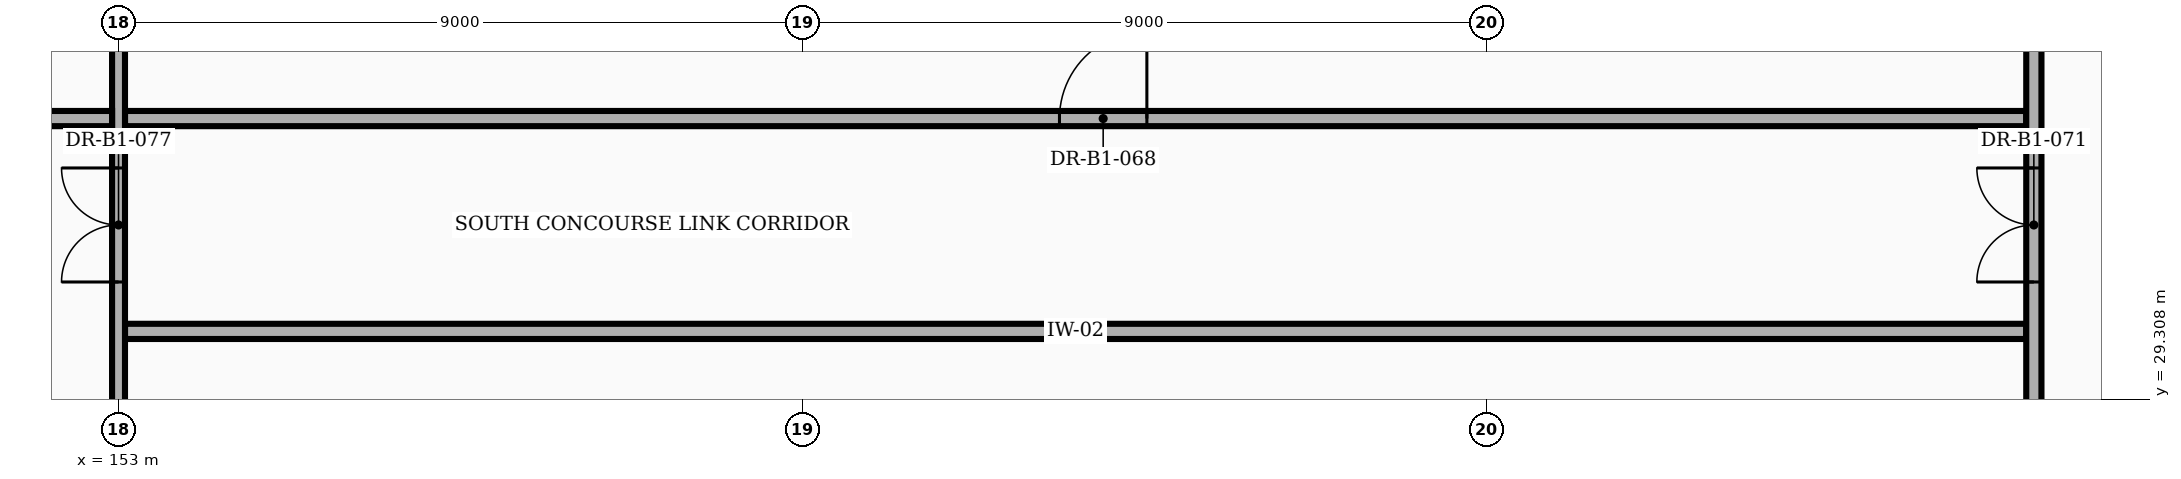
"""IFC4 building model, lengths in metres.
Left out: names, types, materials, properties, quantities, classifications, styles, units other than length and angle.
Written with IfcOpenShell. Run it as: python <this file> out.ifc"""

import sys

from ifc_helpers import new_model, si_unit, direction, frame, frame_2d, origin, place, context, subcontext, project, spatial, rectangle, extrude, element, fill, save


model = new_model("IFC4")
c1 = context("Model", 3, precision=1e-05, world=origin(), true_north=direction((0.0, 1.0)))
c2 = subcontext(c1, "Body", "Model", "MODEL_VIEW")
j1 = project(units=[si_unit("LENGTHUNIT", "METRE"), si_unit("PLANEANGLEUNIT", "RADIAN")], contexts=[c1])
p1 = place(None, origin())
s1 = spatial("IfcSite", under=j1, at=p1, CompositionType="ELEMENT")
p2 = place(p1, origin())
s2 = spatial("IfcBuilding", under=s1, at=p2, CompositionType="ELEMENT")
p3 = place(p2, frame((0.0, 0.0, -4.5)))
s3 = spatial("IfcBuildingStorey", under=s2, at=p3, CompositionType="ELEMENT", Elevation=-4.5)
p4 = place(p3, frame((153.085, 30.2, 0.0), z_axis=(0.0, 0.0, 1.0), x_axis=(1.0, 0.0, 0.0)))
e1 = element("IfcWall", 1, at=p4, inside=s3, PredefinedType="PARTITIONING", context=c2, shape_type="SweptSolid", body=[
    extrude(rectangle(XDim=25.015, YDim=0.2, at=frame_2d((12.508, 0.0))), origin(), (0.0, 0.0, 1.0), 4.24),
])
p5 = place(p3, frame((153.085, 33.0, 0.0), z_axis=(0.0, 0.0, 1.0), x_axis=(1.0, 0.0, 0.0)))
e2 = element("IfcWall", 2, at=p5, inside=s3, PredefinedType="PARTITIONING", context=c2, shape_type="SweptSolid", body=[
    extrude(rectangle(XDim=25.015, YDim=0.2, at=frame_2d((12.508, 0.0))), origin(), (0.0, 0.0, 1.0), 4.24),
])
p6 = place(p5, frame((12.295, 0.0, 0.0)))
e3 = element("IfcOpeningElement", 3, at=p6, cuts=e2, PredefinedType="OPENING", context=c2, shape_type="SweptSolid", body=[
    extrude(rectangle(XDim=1.15, YDim=2.15, at=frame_2d((0.575, 1.075))), frame((0.0, 0.112, 0.0), z_axis=(0.0, -1.0, 0.0), x_axis=(1.0, 0.0, 0.0)), (0.0, 0.0, 1.0), 0.224),
])
p7 = place(p3, frame((178.2, 0.21, 0.0), z_axis=(0.0, 0.0, 1.0), x_axis=(0.0, 1.0, 0.0)))
e4 = element("IfcWall", 4, at=p7, inside=s3, PredefinedType="PARTITIONING", context=c2, shape_type="SweptSolid", body=[
    extrude(rectangle(XDim=39.03, YDim=0.2, at=frame_2d((19.515, 0.0))), origin(), (0.0, 0.0, 1.0), 4.24),
])
p8 = place(p7, frame((10.64, 0.0, 0.0)))
e5 = element("IfcOpeningElement", 5, at=p8, cuts=e4, PredefinedType="OPENING", context=c2, shape_type="SweptSolid", body=[
    extrude(rectangle(XDim=1.7, YDim=2.3, at=frame_2d((0.85, 1.15))), frame((0.0, 0.112, 0.0), z_axis=(0.0, -1.0, 0.0), x_axis=(1.0, 0.0, 0.0)), (0.0, 0.0, 1.0), 0.224),
])
p9 = place(p7, frame((23.64, 0.0, 0.0)))
e6 = element("IfcOpeningElement", 6, at=p9, cuts=e4, PredefinedType="OPENING", context=c2, shape_type="SweptSolid", body=[
    extrude(rectangle(XDim=1.7, YDim=2.3, at=frame_2d((0.85, 1.15))), frame((0.0, 0.112, 0.0), z_axis=(0.0, -1.0, 0.0), x_axis=(1.0, 0.0, 0.0)), (0.0, 0.0, 1.0), 0.224),
])
p10 = place(p7, frame((30.64, 0.0, 0.0)))
e7 = element("IfcOpeningElement", 7, at=p10, cuts=e4, PredefinedType="OPENING", context=c2, shape_type="SweptSolid", body=[
    extrude(rectangle(XDim=1.5, YDim=2.2, at=frame_2d((0.75, 1.1))), frame((0.0, 0.112, 0.0), z_axis=(0.0, -1.0, 0.0), x_axis=(1.0, 0.0, 0.0)), (0.0, 0.0, 1.0), 0.224),
])
p11 = place(p3, frame((153.0, 27.22, 0.0), z_axis=(0.0, 0.0, 1.0), x_axis=(0.0, 1.0, 0.0)))
e8 = element("IfcWall", 8, at=p11, inside=s3, PredefinedType="PARTITIONING", context=c2, shape_type="SweptSolid", body=[
    extrude(rectangle(XDim=8.56, YDim=0.17, at=frame_2d((4.28, 0.0))), origin(), (0.0, 0.0, 1.0), 3.707),
])
p12 = place(p11, frame((3.63, 0.0, 0.0)))
e9 = element("IfcOpeningElement", 9, at=p12, cuts=e8, PredefinedType="OPENING", context=c2, shape_type="SweptSolid", body=[
    extrude(rectangle(XDim=1.5, YDim=2.2, at=frame_2d((0.75, 1.1))), frame((0.0, 0.097, 0.0), z_axis=(0.0, -1.0, 0.0), x_axis=(1.0, 0.0, 0.0)), (0.0, 0.0, 1.0), 0.194),
])
p13 = place(p3, frame((80.06, 33.0, 0.0), z_axis=(0.0, 0.0, 1.0), x_axis=(1.0, 0.0, 0.0)))
e10 = element("IfcWall", 10, at=p13, inside=s3, PredefinedType="PARTITIONING", context=c2, shape_type="SweptSolid", body=[
    extrude(rectangle(XDim=72.855, YDim=0.2, at=frame_2d((36.427, 0.0))), origin(), (0.0, 0.0, 1.0), 4.24),
])
p14 = place(p13, frame((14.0, 0.0, 0.0)))
e11 = element("IfcOpeningElement", 11, at=p14, cuts=e10, PredefinedType="OPENING", context=c2, shape_type="SweptSolid", body=[
    extrude(rectangle(XDim=1.6, YDim=2.3, at=frame_2d((0.8, 1.15))), frame((0.0, 0.112, 0.0), z_axis=(0.0, -1.0, 0.0), x_axis=(1.0, 0.0, 0.0)), (0.0, 0.0, 1.0), 0.224),
])
p15 = place(p13, frame((57.0, 0.0, 0.0)))
e12 = element("IfcOpeningElement", 12, at=p15, cuts=e10, PredefinedType="OPENING", context=c2, shape_type="SweptSolid", body=[
    extrude(rectangle(XDim=1.8, YDim=2.5, at=frame_2d((0.9, 1.25))), frame((0.0, 0.112, 0.0), z_axis=(0.0, -1.0, 0.0), x_axis=(1.0, 0.0, 0.0)), (0.0, 0.0, 1.0), 0.224),
])
p16 = place(p6, origin())
e13 = element("IfcDoor", 13, at=p16, inside=s3, OperationType="SINGLE_SWING_RIGHT", PredefinedType="DOOR", context=c2, shape_type="SweptSolid", body=[
    extrude(rectangle(XDim=1.15, YDim=2.15, at=frame_2d((0.575, 1.075))), frame((0.0, 0.025, 0.0), z_axis=(0.0, -1.0, 0.0), x_axis=(1.0, 0.0, 0.0)), (0.0, 0.0, 1.0), 0.05),
])
fill(e3, e13)
p17 = place(p10, origin())
e14 = element("IfcDoor", 14, at=p17, inside=s3, OperationType="DOUBLE_DOOR_SINGLE_SWING", PredefinedType="DOOR", context=c2, shape_type="SweptSolid", body=[
    extrude(rectangle(XDim=1.5, YDim=2.2, at=frame_2d((0.75, 1.1))), frame((0.0, 0.025, 0.0), z_axis=(0.0, -1.0, 0.0), x_axis=(1.0, 0.0, 0.0)), (0.0, 0.0, 1.0), 0.05),
])
fill(e7, e14)
p18 = place(p12, origin())
e15 = element("IfcDoor", 15, at=p18, inside=s3, OperationType="DOUBLE_DOOR_SINGLE_SWING", PredefinedType="DOOR", context=c2, shape_type="SweptSolid", body=[
    extrude(rectangle(XDim=1.5, YDim=2.2, at=frame_2d((0.75, 1.1))), frame((0.0, 0.025, 0.0), z_axis=(0.0, -1.0, 0.0), x_axis=(1.0, 0.0, 0.0)), (0.0, 0.0, 1.0), 0.05),
])
fill(e9, e15)
save(model, sys.argv[1])
